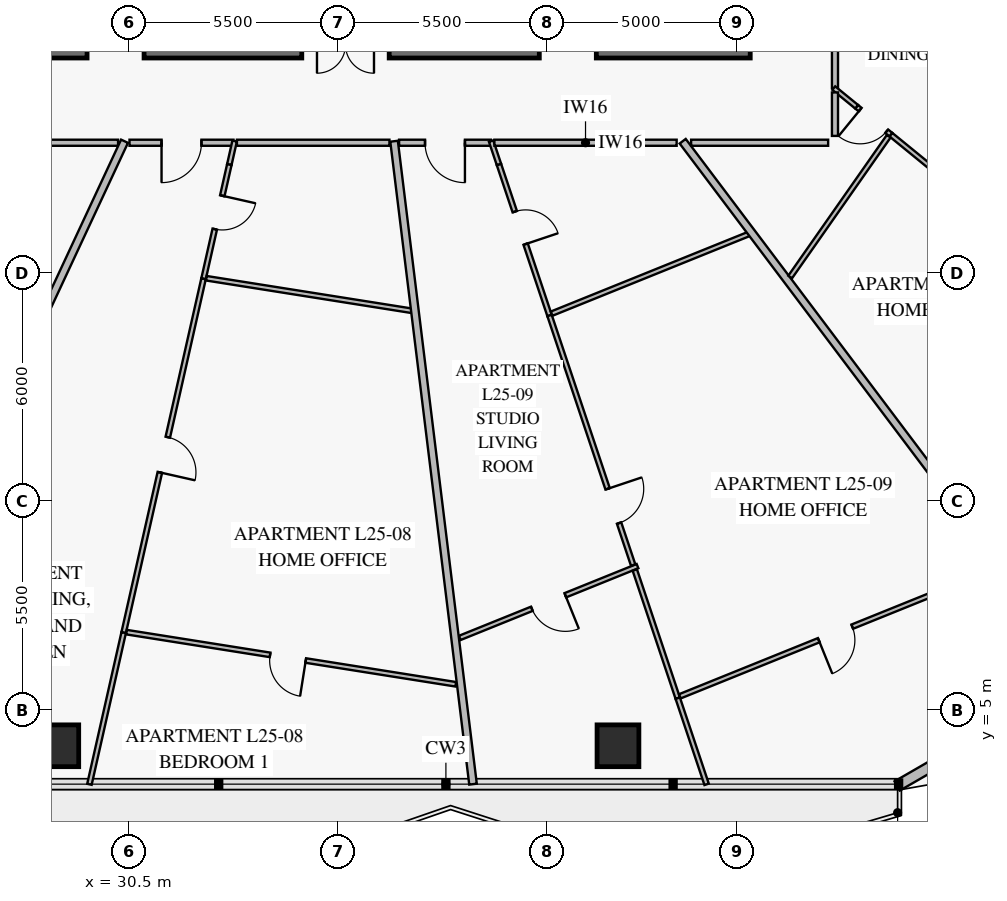
"""IFC4 building model, lengths in metres.
Left out: names, types, materials, properties, quantities, classifications, styles, units other than length and angle.
Written with IfcOpenShell. Run it as: python <this file> out.ifc"""

import sys

from ifc_helpers import new_model, si_unit, direction, frame, frame_2d, origin, origin_2d, place, context, subcontext, project, spatial, rectangle, extrude, element, fill, save


model = new_model("IFC4")
c1 = context("Model", 3, precision=1e-05, world=origin(), true_north=direction((0.0, 1.0)))
c2 = subcontext(c1, "Body", "Model", "MODEL_VIEW")
j1 = project(units=[si_unit("LENGTHUNIT", "METRE"), si_unit("PLANEANGLEUNIT", "RADIAN")], contexts=[c1])
p1 = place(None, origin())
s1 = spatial("IfcSite", under=j1, at=p1, CompositionType="ELEMENT")
p2 = place(p1, origin())
s2 = spatial("IfcBuilding", under=s1, at=p2, CompositionType="ELEMENT")
p3 = place(p2, frame((0.0, 0.0, 103.8)))
s3 = spatial("IfcBuildingStorey", under=s2, at=p3, CompositionType="ELEMENT", Elevation=103.8)
p4 = place(p3, frame((25.15, 22.5, 0.0), z_axis=(0.0, 0.0, 1.0), x_axis=(1.0, 0.0, 0.0)))
e1 = element("IfcWall", 1, at=p4, inside=s3, PredefinedType="SHEAR", context=c2, shape_type="SweptSolid", body=[
    extrude(rectangle(XDim=9.9, YDim=0.7, at=frame_2d((4.95, 0.0))), origin(), (0.0, 0.0, 1.0), 3.8),
])
p5 = place(p4, frame((4.25, 0.0, 0.0)))
e2 = element("IfcOpeningElement", 2, at=p5, cuts=e1, PredefinedType="OPENING", context=c2, shape_type="SweptSolid", body=[
    extrude(rectangle(XDim=1.5, YDim=2.15, at=frame_2d((0.75, 1.075))), frame((0.0, 0.362, 0.0), z_axis=(0.0, -1.0, 0.0), x_axis=(1.0, 0.0, 0.0)), (0.0, 0.0, 1.0), 0.724),
])
p6 = place(p3, frame((37.35, 22.5, 0.0), z_axis=(0.0, 0.0, 1.0), x_axis=(1.0, 0.0, 0.0)))
e3 = element("IfcWall", 3, at=p6, inside=s3, PredefinedType="SHEAR", context=c2, shape_type="SweptSolid", body=[
    extrude(rectangle(XDim=9.5, YDim=0.7, at=frame_2d((4.75, 0.0))), origin(), (0.0, 0.0, 1.0), 3.8),
])
p7 = place(p6, frame((3.95, 0.0, 0.0)))
e4 = element("IfcOpeningElement", 4, at=p7, cuts=e3, PredefinedType="OPENING", context=c2, shape_type="SweptSolid", body=[
    extrude(rectangle(XDim=1.5, YDim=2.15, at=frame_2d((0.75, 1.075))), frame((0.0, 0.362, 0.0), z_axis=(0.0, -1.0, 0.0), x_axis=(1.0, 0.0, 0.0)), (0.0, 0.0, 1.0), 0.724),
])
for number, where, z_axis, x_axis in (
    (5, (28.63, 4.052, 0.0), (0.0, 0.0, 1.0), (1.0, 0.0, 0.0)),
    (6, (43.37, 4.052, 0.0), (0.0, 0.0, 1.0), (1.0, 0.0, 0.0)),
):
    element("IfcColumn", number, at=place(p3, frame(where, z_axis=z_axis, x_axis=x_axis)), inside=s3, PredefinedType="COLUMN", context=c2, shape_type="SweptSolid", body=[
        extrude(rectangle(XDim=1.1, YDim=1.1, at=origin_2d()), origin(), (0.0, 0.0, 1.0), 3.55),
    ])
p8 = place(p3, frame((53.761, 4.751, 0.0), z_axis=(0.0, 0.0, 1.0), x_axis=(-0.866007452331, -0.500031091541, 0.0)))
e7 = element("IfcWall", 7, at=p8, inside=s3, PredefinedType="SOLIDWALL", context=c2, shape_type="SweptSolid", body=[
    extrude(rectangle(XDim=3.515, YDim=0.28, at=frame_2d((1.757, 0.0))), origin(), (0.0, 0.0, 1.0), 3.55),
])
p9 = place(p3, frame((23.537, 19.92, 0.0), z_axis=(0.0, 0.0, 1.0), x_axis=(1.0, 0.0, 0.0)))
e8 = element("IfcWall", 8, at=p9, inside=s3, PredefinedType="PARTITIONING", context=c2, shape_type="SweptSolid", body=[
    extrude(rectangle(XDim=6.679, YDim=0.16, at=frame_2d((3.339, 0.0))), origin(), (0.0, 0.0, 1.0), 2.85),
])
p10 = place(p9, frame((2.814, 0.0, 0.0)))
e9 = element("IfcOpeningElement", 9, at=p10, cuts=e8, PredefinedType="OPENING", context=c2, shape_type="SweptSolid", body=[
    extrude(rectangle(XDim=1.05, YDim=2.15, at=frame_2d((0.525, 1.075))), frame((0.0, 0.092, 0.0), z_axis=(0.0, -1.0, 0.0), x_axis=(1.0, 0.0, 0.0)), (0.0, 0.0, 1.0), 0.184),
])
p11 = place(p3, frame((33.145, 19.35, 0.0), z_axis=(0.0, 0.0, 1.0), x_axis=(-0.220163710026, -0.975462936655, 0.0)))
e10 = element("IfcWall", 10, at=p11, inside=s3, PredefinedType="PARTITIONING", context=c2, shape_type="SweptSolid", body=[
    extrude(rectangle(XDim=3.085, YDim=0.12, at=frame_2d((1.542, 0.0))), origin(), (0.0, 0.0, 1.0), 3.55),
])
p12 = place(p11, frame((0.846, 0.0, 0.0)))
e11 = element("IfcOpeningElement", 11, at=p12, cuts=e10, PredefinedType="OPENING", context=c2, shape_type="SweptSolid", body=[
    extrude(rectangle(XDim=0.9, YDim=2.1, at=frame_2d((0.45, 1.05))), frame((0.0, 0.072, 0.0), z_axis=(0.0, -1.0, 0.0), x_axis=(1.0, 0.0, 0.0)), (0.0, 0.0, 1.0), 0.144),
])
p13 = place(p3, frame((32.465, 16.341, 0.0), z_axis=(0.0, 0.0, 1.0), x_axis=(-0.220183949045, -0.975458368452, 0.0)))
e12 = element("IfcWall", 12, at=p13, inside=s3, PredefinedType="PARTITIONING", context=c2, shape_type="SweptSolid", body=[
    extrude(rectangle(XDim=9.547, YDim=0.12, at=frame_2d((4.773, 0.0))), origin(), (0.0, 0.0, 1.0), 3.1),
])
p14 = place(p13, frame((4.273, 0.0, 0.0)))
e13 = element("IfcOpeningElement", 13, at=p14, cuts=e12, PredefinedType="OPENING", context=c2, shape_type="SweptSolid", body=[
    extrude(rectangle(XDim=0.95, YDim=2.1, at=frame_2d((0.475, 1.05))), frame((0.0, 0.072, 0.0), z_axis=(0.0, -1.0, 0.0), x_axis=(1.0, 0.0, 0.0)), (0.0, 0.0, 1.0), 0.144),
])
p15 = place(p3, frame((30.436, 7.042, 0.0), z_axis=(0.0, 0.0, 1.0), x_axis=(0.987688614877, -0.156432733283, 0.0)))
e14 = element("IfcWall", 14, at=p15, inside=s3, PredefinedType="PARTITIONING", context=c2, shape_type="SweptSolid", body=[
    extrude(rectangle(XDim=8.772, YDim=0.12, at=frame_2d((4.386, 0.0))), origin(), (0.0, 0.0, 1.0), 3.55),
])
p16 = place(p15, frame((3.827, 0.0, 0.0)))
e15 = element("IfcOpeningElement", 15, at=p16, cuts=e14, PredefinedType="OPENING", context=c2, shape_type="SweptSolid", body=[
    extrude(rectangle(XDim=0.95, YDim=2.1, at=frame_2d((0.475, 1.05))), frame((0.0, 0.072, 0.0), z_axis=(0.0, -1.0, 0.0), x_axis=(1.0, 0.0, 0.0)), (0.0, 0.0, 1.0), 0.144),
])
p17 = place(p3, frame((30.517, 19.92, 0.0), z_axis=(0.0, 0.0, 1.0), x_axis=(1.0, 0.0, 0.0)))
e16 = element("IfcWall", 16, at=p17, inside=s3, PredefinedType="PARTITIONING", context=c2, shape_type="SweptSolid", body=[
    extrude(rectangle(XDim=2.736, YDim=0.16, at=frame_2d((1.368, 0.0))), origin(), (0.0, 0.0, 1.0), 2.85),
])
p18 = place(p17, frame((0.843, 0.0, 0.0)))
e17 = element("IfcOpeningElement", 17, at=p18, cuts=e16, PredefinedType="OPENING", context=c2, shape_type="SweptSolid", body=[
    extrude(rectangle(XDim=1.05, YDim=2.15, at=frame_2d((0.525, 1.075))), frame((0.0, 0.092, 0.0), z_axis=(0.0, -1.0, 0.0), x_axis=(1.0, 0.0, 0.0)), (0.0, 0.0, 1.0), 0.184),
])
p19 = place(p3, frame((39.205, 6.889, 0.0), z_axis=(0.0, 0.0, 1.0), x_axis=(0.927186587095, 0.3745998301, 0.0)))
e18 = element("IfcWall", 18, at=p19, inside=s3, PredefinedType="PARTITIONING", context=c2, shape_type="SweptSolid", body=[
    extrude(rectangle(XDim=5.046, YDim=0.12, at=frame_2d((2.523, 0.0))), origin(), (0.0, 0.0, 1.0), 2.85),
])
p20 = place(p19, frame((2.048, 0.0, 0.0)))
e19 = element("IfcOpeningElement", 19, at=p20, cuts=e18, PredefinedType="OPENING", context=c2, shape_type="SweptSolid", body=[
    extrude(rectangle(XDim=0.95, YDim=2.1, at=frame_2d((0.475, 1.05))), frame((0.0, 0.072, 0.0), z_axis=(0.0, -1.0, 0.0), x_axis=(1.0, 0.0, 0.0)), (0.0, 0.0, 1.0), 0.144),
])
p21 = place(p3, frame((40.238, 19.35, 0.0), z_axis=(0.0, 0.0, 1.0), x_axis=(0.317607066426, -0.948222416607, 0.0)))
e20 = element("IfcWall", 20, at=p21, inside=s3, PredefinedType="PARTITIONING", context=c2, shape_type="SweptSolid", body=[
    extrude(rectangle(XDim=4.194, YDim=0.12, at=frame_2d((2.097, 0.0))), origin(), (0.0, 0.0, 1.0), 3.55),
])
p22 = place(p21, frame((1.311, 0.0, 0.0)))
e21 = element("IfcOpeningElement", 21, at=p22, cuts=e20, PredefinedType="OPENING", context=c2, shape_type="SweptSolid", body=[
    extrude(rectangle(XDim=0.9, YDim=2.1, at=frame_2d((0.45, 1.05))), frame((0.0, 0.072, 0.0), z_axis=(0.0, -1.0, 0.0), x_axis=(1.0, 0.0, 0.0)), (0.0, 0.0, 1.0), 0.144),
])
p23 = place(p3, frame((41.57, 15.373, 0.0), z_axis=(0.0, 0.0, 1.0), x_axis=(0.317623415575, -0.948216940303, 0.0)))
e22 = element("IfcWall", 22, at=p23, inside=s3, PredefinedType="PARTITIONING", context=c2, shape_type="SweptSolid", body=[
    extrude(rectangle(XDim=6.926, YDim=0.12, at=frame_2d((3.463, 0.0))), origin(), (0.0, 0.0, 1.0), 3.1),
])
p24 = place(p23, frame((4.81, 0.0, 0.0)))
e23 = element("IfcOpeningElement", 23, at=p24, cuts=e22, PredefinedType="OPENING", context=c2, shape_type="SweptSolid", body=[
    extrude(rectangle(XDim=0.95, YDim=2.1, at=frame_2d((0.475, 1.05))), frame((0.0, 0.072, 0.0), z_axis=(0.0, -1.0, 0.0), x_axis=(1.0, 0.0, 0.0)), (0.0, 0.0, 1.0), 0.144),
])
p25 = place(p3, frame((43.813, 8.677, 0.0), z_axis=(0.0, 0.0, 1.0), x_axis=(0.317627204672, -0.948215671065, 0.0)))
e24 = element("IfcWall", 24, at=p25, inside=s3, PredefinedType="PARTITIONING", context=c2, shape_type="SweptSolid", body=[
    extrude(rectangle(XDim=3.558, YDim=0.12, at=frame_2d((1.779, 0.0))), origin(), (0.0, 0.0, 1.0), 3.55),
])
p26 = place(p3, frame((44.998, 5.353, 0.0), z_axis=(0.0, 0.0, 1.0), x_axis=(0.927180810677, 0.374614127221, 0.0)))
e25 = element("IfcWall", 25, at=p26, inside=s3, PredefinedType="PARTITIONING", context=c2, shape_type="SweptSolid", body=[
    extrude(rectangle(XDim=9.004, YDim=0.12, at=frame_2d((4.502, 0.0))), origin(), (0.0, 0.0, 1.0), 2.8),
])
p27 = place(p26, frame((3.943, 0.0, 0.0)))
e26 = element("IfcOpeningElement", 26, at=p27, cuts=e25, PredefinedType="OPENING", context=c2, shape_type="SweptSolid", body=[
    extrude(rectangle(XDim=0.95, YDim=2.1, at=frame_2d((0.475, 1.05))), frame((0.0, 0.072, 0.0), z_axis=(0.0, -1.0, 0.0), x_axis=(1.0, 0.0, 0.0)), (0.0, 0.0, 1.0), 0.144),
])
p28 = place(p3, frame((37.611, 19.92, 0.0), z_axis=(0.0, 0.0, 1.0), x_axis=(1.0, 0.0, 0.0)))
e27 = element("IfcWall", 27, at=p28, inside=s3, PredefinedType="PARTITIONING", context=c2, shape_type="SweptSolid", body=[
    extrude(rectangle(XDim=2.415, YDim=0.16, at=frame_2d((1.208, 0.0))), origin(), (0.0, 0.0, 1.0), 2.85),
])
p29 = place(p28, frame((0.683, 0.0, 0.0)))
e28 = element("IfcOpeningElement", 28, at=p29, cuts=e27, PredefinedType="OPENING", context=c2, shape_type="SweptSolid", body=[
    extrude(rectangle(XDim=1.05, YDim=2.15, at=frame_2d((0.525, 1.075))), frame((0.0, 0.092, 0.0), z_axis=(0.0, -1.0, 0.0), x_axis=(1.0, 0.0, 0.0)), (0.0, 0.0, 1.0), 0.184),
])
p30 = place(p3, frame((49.65, 20.867, 0.0), z_axis=(0.0, 0.0, 1.0), x_axis=(0.775048691625, -0.631901515752, 0.0)))
e29 = element("IfcWall", 29, at=p30, inside=s3, PredefinedType="PARTITIONING", context=c2, shape_type="SweptSolid", body=[
    extrude(rectangle(XDim=1.165, YDim=0.12, at=frame_2d((0.583, 0.0))), origin(), (0.0, 0.0, 1.0), 3.55),
])
p31 = place(p30, frame((0.12, 0.0, 0.0)))
e30 = element("IfcOpeningElement", 30, at=p31, cuts=e29, PredefinedType="OPENING", context=c2, shape_type="SweptSolid", body=[
    extrude(rectangle(XDim=0.9, YDim=2.1, at=frame_2d((0.45, 1.05))), frame((0.0, 0.072, 0.0), z_axis=(0.0, -1.0, 0.0), x_axis=(1.0, 0.0, 0.0)), (0.0, 0.0, 1.0), 0.144),
])
p32 = place(p3, frame((50.553, 20.131, 0.0), z_axis=(0.0, 0.0, 1.0), x_axis=(0.7749603795, -0.632009818124, 0.0)))
e31 = element("IfcWall", 31, at=p32, inside=s3, PredefinedType="PARTITIONING", context=c2, shape_type="SweptSolid", body=[
    extrude(rectangle(XDim=3.597, YDim=0.12, at=frame_2d((1.798, 0.0))), origin(), (0.0, 0.0, 1.0), 3.1),
])
p33 = place(p32, frame((1.971, 0.0, 0.0)))
e32 = element("IfcOpeningElement", 32, at=p33, cuts=e31, PredefinedType="OPENING", context=c2, shape_type="SweptSolid", body=[
    extrude(rectangle(XDim=0.95, YDim=2.1, at=frame_2d((0.475, 1.05))), frame((0.0, 0.072, 0.0), z_axis=(0.0, -1.0, 0.0), x_axis=(1.0, 0.0, 0.0)), (0.0, 0.0, 1.0), 0.144),
])
p34 = place(p3, frame((49.08, 21.358, 0.0), z_axis=(0.0, 0.0, 1.0), x_axis=(0.0, 1.0, 0.0)))
e33 = element("IfcWall", 33, at=p34, inside=s3, PredefinedType="PARTITIONING", context=c2, shape_type="SweptSolid", body=[
    extrude(rectangle(XDim=6.497, YDim=0.16, at=frame_2d((3.249, 0.0))), origin(), (0.0, 0.0, 1.0), 3.55),
])
p35 = place(p34, frame((2.723, 0.0, 0.0)))
e34 = element("IfcOpeningElement", 34, at=p35, cuts=e33, PredefinedType="OPENING", context=c2, shape_type="SweptSolid", body=[
    extrude(rectangle(XDim=1.05, YDim=2.15, at=frame_2d((0.525, 1.075))), frame((0.0, 0.092, 0.0), z_axis=(0.0, -1.0, 0.0), x_axis=(1.0, 0.0, 0.0)), (0.0, 0.0, 1.0), 0.184),
])
p36 = place(p3, frame((30.386, 19.96, 0.0), z_axis=(0.0, 0.0, 1.0), x_axis=(-0.422626983595, -0.906303719918, 0.0)))
e35 = element("IfcWall", 35, at=p36, inside=s3, PredefinedType="PARTITIONING", context=c2, shape_type="SweptSolid", body=[
    extrude(rectangle(XDim=18.667, YDim=0.2, at=frame_2d((9.334, 0.0))), origin(), (0.0, 0.0, 1.0), 2.8),
])
p37 = place(p3, frame((33.283, 19.965, 0.0), z_axis=(0.0, 0.0, 1.0), x_axis=(-0.220332181963, -0.975424896951, 0.0)))
e36 = element("IfcWall", 36, at=p37, inside=s3, PredefinedType="PARTITIONING", context=c2, shape_type="SweptSolid", body=[
    extrude(rectangle(XDim=0.63, YDim=0.12, at=frame_2d((0.315, 0.0))), origin(), (0.0, 0.0, 1.0), 3.55),
])
p38 = place(p3, frame((30.363, 7.028, 0.0), z_axis=(0.0, 0.0, 1.0), x_axis=(-0.220176625834, -0.975460021444, 0.0)))
e37 = element("IfcWall", 37, at=p38, inside=s3, PredefinedType="PARTITIONING", context=c2, shape_type="SweptSolid", body=[
    extrude(rectangle(XDim=4.092, YDim=0.12, at=frame_2d((2.046, 0.0))), origin(), (0.0, 0.0, 1.0), 2.8),
])
p39 = place(p3, frame((32.538, 16.354, 0.0), z_axis=(0.0, 0.0, 1.0), x_axis=(0.987690664092, -0.156419794354, 0.0)))
e38 = element("IfcWall", 38, at=p39, inside=s3, PredefinedType="PARTITIONING", context=c2, shape_type="SweptSolid", body=[
    extrude(rectangle(XDim=5.511, YDim=0.12, at=frame_2d((2.756, 0.0))), origin(), (0.0, 0.0, 1.0), 3.55),
])
p40 = place(p3, frame((37.478, 19.96, 0.0), z_axis=(0.0, 0.0, 1.0), x_axis=(0.121873230726, -0.992545674331, 0.0)))
e39 = element("IfcWall", 39, at=p40, inside=s3, PredefinedType="PARTITIONING", context=c2, shape_type="SweptSolid", body=[
    extrude(rectangle(XDim=17.045, YDim=0.2, at=frame_2d((8.523, 0.0))), origin(), (0.0, 0.0, 1.0), 2.8),
])
p41 = place(p3, frame((40.032, 19.964, 0.0), z_axis=(0.0, 0.0, 1.0), x_axis=(0.317698912626, -0.948191647778, 0.0)))
e40 = element("IfcWall", 40, at=p41, inside=s3, PredefinedType="PARTITIONING", context=c2, shape_type="SweptSolid", body=[
    extrude(rectangle(XDim=0.647, YDim=0.12, at=frame_2d((0.323, 0.0))), origin(), (0.0, 0.0, 1.0), 3.55),
])
p42 = place(p3, frame((44.943, 5.303, 0.0), z_axis=(0.0, 0.0, 1.0), x_axis=(0.317697926169, -0.948191978297, 0.0)))
e41 = element("IfcWall", 41, at=p42, inside=s3, PredefinedType="PARTITIONING", context=c2, shape_type="SweptSolid", body=[
    extrude(rectangle(XDim=2.391, YDim=0.12, at=frame_2d((1.195, 0.0))), origin(), (0.0, 0.0, 1.0), 2.8),
])
p43 = place(p3, frame((41.625, 15.423, 0.0), z_axis=(0.0, 0.0, 1.0), x_axis=(0.927188436263, 0.374595253121, 0.0)))
e42 = element("IfcWall", 42, at=p43, inside=s3, PredefinedType="PARTITIONING", context=c2, shape_type="SweptSolid", body=[
    extrude(rectangle(XDim=5.618, YDim=0.12, at=frame_2d((2.809, 0.0))), origin(), (0.0, 0.0, 1.0), 3.55),
])
p44 = place(p3, frame((45.073, 19.96, 0.0), z_axis=(0.0, 0.0, 1.0), x_axis=(0.60181525353, -0.798635336445, 0.0)))
e43 = element("IfcWall", 43, at=p44, inside=s3, PredefinedType="PARTITIONING", context=c2, shape_type="SweptSolid", body=[
    extrude(rectangle(XDim=16.384, YDim=0.2, at=frame_2d((8.192, 0.0))), origin(), (0.0, 0.0, 1.0), 2.8),
])
p45 = place(p3, frame((49.048, 21.358, 0.0), z_axis=(0.0, 0.0, 1.0), x_axis=(0.774881234923, -0.63210685154, 0.0)))
e44 = element("IfcWall", 44, at=p45, inside=s3, PredefinedType="PARTITIONING", context=c2, shape_type="SweptSolid", body=[
    extrude(rectangle(XDim=0.776, YDim=0.12, at=frame_2d((0.388, 0.0))), origin(), (0.0, 0.0, 1.0), 3.55),
])
p46 = place(p3, frame((47.901, 16.387, 0.0), z_axis=(0.0, 0.0, 1.0), x_axis=(0.573556554724, 0.819165965195, 0.0)))
e45 = element("IfcWall", 45, at=p46, inside=s3, PredefinedType="PARTITIONING", context=c2, shape_type="SweptSolid", body=[
    extrude(rectangle(XDim=4.522, YDim=0.12, at=frame_2d((2.261, 0.0))), origin(), (0.0, 0.0, 1.0), 2.85),
])
p47 = place(p3, frame((33.343, 19.92, 0.0), z_axis=(0.0, 0.0, 1.0), x_axis=(1.0, 0.0, 0.0)))
e46 = element("IfcWall", 46, at=p47, inside=s3, PredefinedType="PARTITIONING", context=c2, shape_type="SweptSolid", body=[
    extrude(rectangle(XDim=4.013, YDim=0.16, at=frame_2d((2.007, 0.0))), origin(), (0.0, 0.0, 1.0), 3.55),
])
p48 = place(p3, frame((40.118, 19.92, 0.0), z_axis=(0.0, 0.0, 1.0), x_axis=(1.0, 0.0, 0.0)))
e47 = element("IfcWall", 47, at=p48, inside=s3, PredefinedType="PARTITIONING", context=c2, shape_type="SweptSolid", body=[
    extrude(rectangle(XDim=4.795, YDim=0.16, at=frame_2d((2.398, 0.0))), origin(), (0.0, 0.0, 1.0), 3.55),
])
p49 = place(p3, frame((45.294, 19.92, 0.0), z_axis=(0.0, 0.0, 1.0), x_axis=(1.0, 0.0, 0.0)))
e48 = element("IfcWall", 48, at=p49, inside=s3, PredefinedType="PARTITIONING", context=c2, shape_type="SweptSolid", body=[
    extrude(rectangle(XDim=3.605, YDim=0.16, at=frame_2d((1.803, 0.0))), origin(), (0.0, 0.0, 1.0), 2.85),
])
p50 = place(p3, frame((49.08, 20.1, 0.0), z_axis=(0.0, 0.0, 1.0), x_axis=(0.0, 1.0, 0.0)))
e49 = element("IfcWall", 49, at=p50, inside=s3, PredefinedType="PARTITIONING", context=c2, shape_type="SweptSolid", body=[
    extrude(rectangle(XDim=1.144, YDim=0.16, at=frame_2d((0.572, 0.0))), origin(), (0.0, 0.0, 1.0), 3.55),
])
p51 = place(p12, origin())
e50 = element("IfcDoor", 50, at=p51, inside=s3, OperationType="SINGLE_SWING_LEFT", PredefinedType="DOOR", context=c2, shape_type="SweptSolid", body=[
    extrude(rectangle(XDim=0.9, YDim=2.1, at=frame_2d((0.45, 1.05))), frame((0.0, 0.025, 0.0), z_axis=(0.0, -1.0, 0.0), x_axis=(1.0, 0.0, 0.0)), (0.0, 0.0, 1.0), 0.05),
])
fill(e11, e50)
p52 = place(p14, origin())
e51 = element("IfcDoor", 51, at=p52, inside=s3, OperationType="SINGLE_SWING_RIGHT", PredefinedType="DOOR", context=c2, shape_type="SweptSolid", body=[
    extrude(rectangle(XDim=0.95, YDim=2.1, at=frame_2d((0.475, 1.05))), frame((0.0, 0.025, 0.0), z_axis=(0.0, -1.0, 0.0), x_axis=(1.0, 0.0, 0.0)), (0.0, 0.0, 1.0), 0.05),
])
fill(e13, e51)
p53 = place(p16, frame((0.95, 0.0, 0.0), z_axis=(0.0, 0.0, 1.0), x_axis=(-1.0, 0.0, 0.0)))
e52 = element("IfcDoor", 52, at=p53, inside=s3, OperationType="SINGLE_SWING_LEFT", PredefinedType="DOOR", context=c2, shape_type="SweptSolid", body=[
    extrude(rectangle(XDim=0.95, YDim=2.1, at=frame_2d((0.475, 1.05))), frame((0.0, 0.025, 0.0), z_axis=(0.0, -1.0, 0.0), x_axis=(1.0, 0.0, 0.0)), (0.0, 0.0, 1.0), 0.05),
])
fill(e15, e52)
p54 = place(p18, frame((1.05, 0.0, 0.0), z_axis=(0.0, 0.0, 1.0), x_axis=(-1.0, 0.0, 0.0)))
e53 = element("IfcDoor", 53, at=p54, inside=s3, OperationType="SINGLE_SWING_RIGHT", PredefinedType="DOOR", context=c2, shape_type="SweptSolid", body=[
    extrude(rectangle(XDim=1.05, YDim=2.15, at=frame_2d((0.525, 1.075))), frame((0.0, 0.025, 0.0), z_axis=(0.0, -1.0, 0.0), x_axis=(1.0, 0.0, 0.0)), (0.0, 0.0, 1.0), 0.05),
])
fill(e17, e53)
p55 = place(p20, frame((0.95, 0.0, 0.0), z_axis=(0.0, 0.0, 1.0), x_axis=(-1.0, 0.0, 0.0)))
e54 = element("IfcDoor", 54, at=p55, inside=s3, OperationType="SINGLE_SWING_LEFT", PredefinedType="DOOR", context=c2, shape_type="SweptSolid", body=[
    extrude(rectangle(XDim=0.95, YDim=2.1, at=frame_2d((0.475, 1.05))), frame((0.0, 0.025, 0.0), z_axis=(0.0, -1.0, 0.0), x_axis=(1.0, 0.0, 0.0)), (0.0, 0.0, 1.0), 0.05),
])
fill(e19, e54)
p56 = place(p22, origin())
e55 = element("IfcDoor", 55, at=p56, inside=s3, OperationType="SINGLE_SWING_RIGHT", PredefinedType="DOOR", context=c2, shape_type="SweptSolid", body=[
    extrude(rectangle(XDim=0.9, YDim=2.1, at=frame_2d((0.45, 1.05))), frame((0.0, 0.025, 0.0), z_axis=(0.0, -1.0, 0.0), x_axis=(1.0, 0.0, 0.0)), (0.0, 0.0, 1.0), 0.05),
])
fill(e21, e55)
p57 = place(p24, origin())
e56 = element("IfcDoor", 56, at=p57, inside=s3, OperationType="SINGLE_SWING_LEFT", PredefinedType="DOOR", context=c2, shape_type="SweptSolid", body=[
    extrude(rectangle(XDim=0.95, YDim=2.1, at=frame_2d((0.475, 1.05))), frame((0.0, 0.025, 0.0), z_axis=(0.0, -1.0, 0.0), x_axis=(1.0, 0.0, 0.0)), (0.0, 0.0, 1.0), 0.05),
])
fill(e23, e56)
p58 = place(p27, frame((0.95, 0.0, 0.0), z_axis=(0.0, 0.0, 1.0), x_axis=(-1.0, 0.0, 0.0)))
e57 = element("IfcDoor", 57, at=p58, inside=s3, OperationType="SINGLE_SWING_RIGHT", PredefinedType="DOOR", context=c2, shape_type="SweptSolid", body=[
    extrude(rectangle(XDim=0.95, YDim=2.1, at=frame_2d((0.475, 1.05))), frame((0.0, 0.025, 0.0), z_axis=(0.0, -1.0, 0.0), x_axis=(1.0, 0.0, 0.0)), (0.0, 0.0, 1.0), 0.05),
])
fill(e26, e57)
p59 = place(p29, frame((1.05, 0.0, 0.0), z_axis=(0.0, 0.0, 1.0), x_axis=(-1.0, 0.0, 0.0)))
e58 = element("IfcDoor", 58, at=p59, inside=s3, OperationType="SINGLE_SWING_LEFT", PredefinedType="DOOR", context=c2, shape_type="SweptSolid", body=[
    extrude(rectangle(XDim=1.05, YDim=2.15, at=frame_2d((0.525, 1.075))), frame((0.0, 0.025, 0.0), z_axis=(0.0, -1.0, 0.0), x_axis=(1.0, 0.0, 0.0)), (0.0, 0.0, 1.0), 0.05),
])
fill(e28, e58)
p60 = place(p31, frame((0.9, 0.0, 0.0), z_axis=(0.0, 0.0, 1.0), x_axis=(-1.0, 0.0, 0.0)))
e59 = element("IfcDoor", 59, at=p60, inside=s3, OperationType="SINGLE_SWING_RIGHT", PredefinedType="DOOR", context=c2, shape_type="SweptSolid", body=[
    extrude(rectangle(XDim=0.9, YDim=2.1, at=frame_2d((0.45, 1.05))), frame((0.0, 0.025, 0.0), z_axis=(0.0, -1.0, 0.0), x_axis=(1.0, 0.0, 0.0)), (0.0, 0.0, 1.0), 0.05),
])
fill(e30, e59)
save(model, sys.argv[1])
